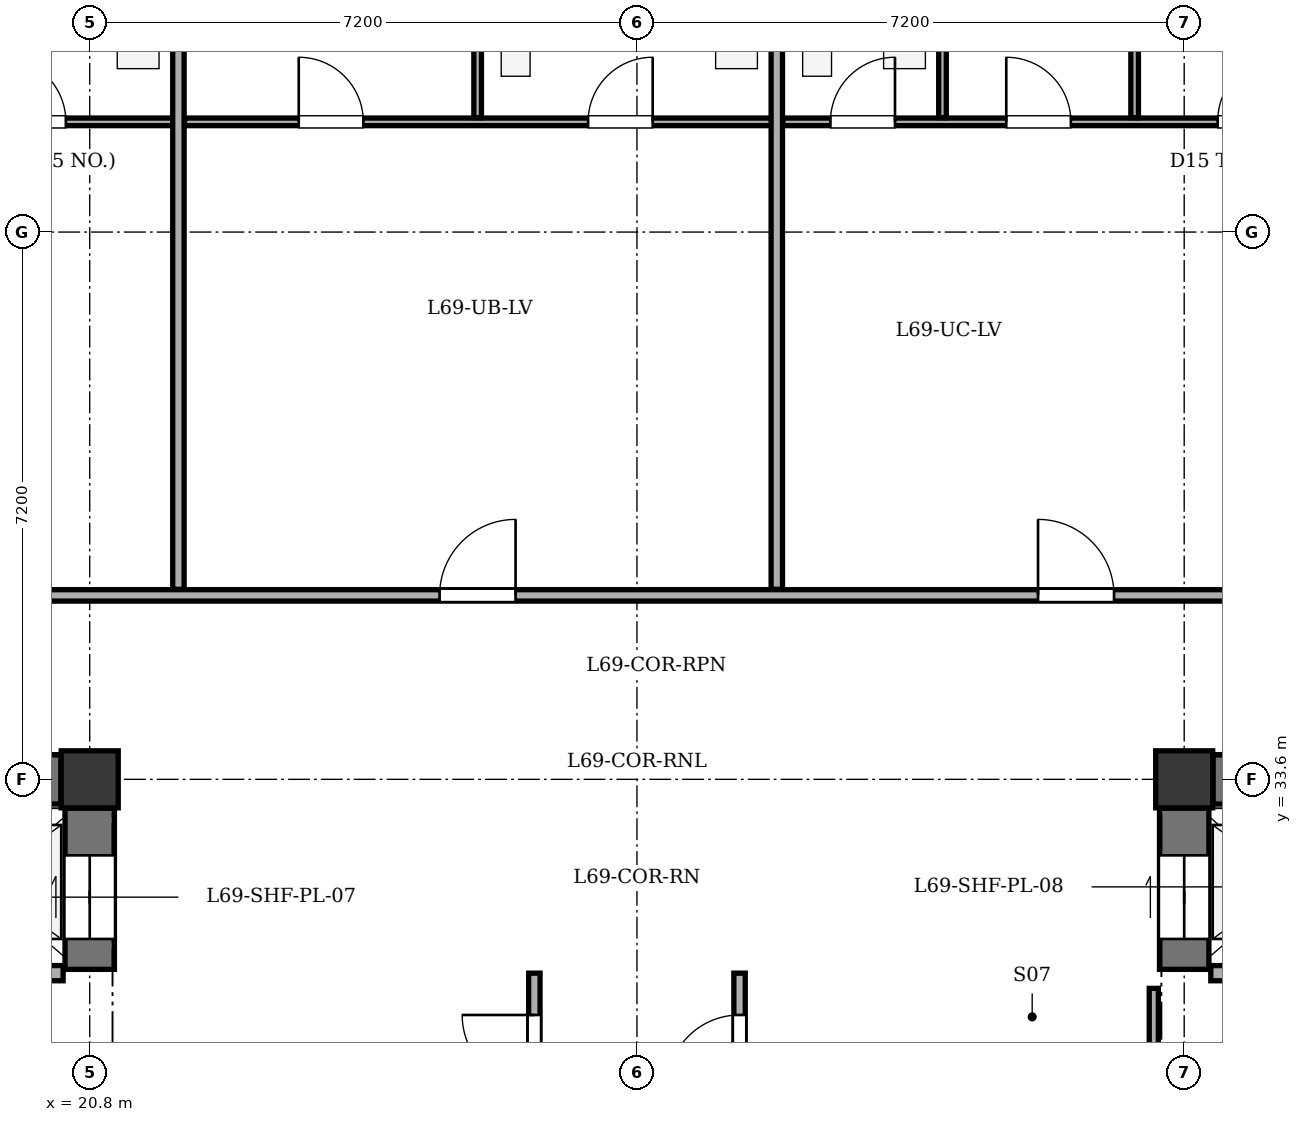
"""IFC4 building model, lengths in metres.
Left out: names, types, materials, properties, quantities, classifications, styles, units other than length and angle.
Written with IfcOpenShell. Run it as: python <this file> out.ifc"""

import sys

from ifc_helpers import new_model, si_unit, direction, frame, frame_2d, origin, origin_2d, place, context, subcontext, project, spatial, rectangle, extrude, element, fill, save


model = new_model("IFC4")
c1 = context("Model", 3, precision=1e-05, world=origin(), true_north=direction((0.0, 1.0)))
c2 = subcontext(c1, "Body", "Model", "MODEL_VIEW")
j1 = project(units=[si_unit("LENGTHUNIT", "METRE"), si_unit("PLANEANGLEUNIT", "RADIAN")], contexts=[c1])
p1 = place(None, origin())
s1 = spatial("IfcSite", under=j1, at=p1, CompositionType="ELEMENT")
p2 = place(p1, origin())
s2 = spatial("IfcBuilding", under=s1, at=p2, CompositionType="ELEMENT")
p3 = place(p2, frame((0.0, 0.0, 261.9)))
s3 = spatial("IfcBuildingStorey", under=s2, at=p3, CompositionType="ELEMENT", Elevation=261.9)
for number, where, z_axis, x_axis in (
    (1, (20.8, 33.6, 0.0), (0.0, 0.0, 1.0), (1.0, 0.0, 0.0)),
    (2, (35.2, 33.6, 0.0), (0.0, 0.0, 1.0), (1.0, 0.0, 0.0)),
):
    element("IfcColumn", number, at=place(p3, frame(where, z_axis=z_axis, x_axis=x_axis)), inside=s3, PredefinedType="COLUMN", context=c2, shape_type="SweptSolid", body=[
        extrude(rectangle(XDim=0.75, YDim=0.75, at=origin_2d()), origin(), (0.0, 0.0, 1.0), 3.4),
    ])
p4 = place(p3, frame((13.18, 33.6, 0.0), z_axis=(0.0, 0.0, 1.0), x_axis=(1.0, 0.0, 0.0)))
e3 = element("IfcWall", 3, at=p4, inside=s3, PredefinedType="SHEAR", context=c2, shape_type="SweptSolid", body=[
    extrude(rectangle(XDim=7.24, YDim=0.65, at=frame_2d((3.62, 0.0))), origin(), (0.0, 0.0, 1.0), 3.1),
])
p5 = place(p4, frame((1.22, 0.0, 0.0)))
e4 = element("IfcOpeningElement", 4, at=p5, cuts=e3, PredefinedType="OPENING", context=c2, shape_type="SweptSolid", body=[
    extrude(rectangle(XDim=0.85, YDim=2.02, at=frame_2d((0.425, 1.01))), frame((0.0, 0.335, 0.0), z_axis=(0.0, -1.0, 0.0), x_axis=(1.0, 0.0, 0.0)), (0.0, 0.0, 1.0), 0.67),
])
p6 = place(p3, frame((20.8, 31.1, 0.0), z_axis=(0.0, 0.0, 1.0), x_axis=(0.0, 1.0, 0.0)))
e5 = element("IfcWall", 5, at=p6, inside=s3, PredefinedType="SHEAR", context=c2, shape_type="SweptSolid", body=[
    extrude(rectangle(XDim=2.12, YDim=0.65, at=frame_2d((1.06, 0.0))), origin(), (0.0, 0.0, 1.0), 3.1),
])
p7 = place(p6, frame((0.4, 0.0, 0.0)))
e6 = element("IfcOpeningElement", 6, at=p7, cuts=e5, PredefinedType="OPENING", context=c2, shape_type="SweptSolid", body=[
    extrude(rectangle(XDim=1.1, YDim=2.1, at=frame_2d((0.55, 1.05))), frame((0.0, 0.335, 0.0), z_axis=(0.0, -1.0, 0.0), x_axis=(1.0, 0.0, 0.0)), (0.0, 0.0, 1.0), 0.67),
])
p8 = place(p3, frame((16.6, 31.05, 0.0), z_axis=(0.0, 0.0, 1.0), x_axis=(1.0, 0.0, 0.0)))
e7 = element("IfcWall", 7, at=p8, inside=s3, PredefinedType="SOLIDWALL", context=c2, shape_type="SweptSolid", body=[
    extrude(rectangle(XDim=3.85, YDim=0.2, at=frame_2d((1.925, 0.0))), origin(), (0.0, 0.0, 1.0), 3.1),
])
p9 = place(p3, frame((35.58, 33.6, 0.0), z_axis=(0.0, 0.0, 1.0), x_axis=(1.0, 0.0, 0.0)))
e8 = element("IfcWall", 8, at=p9, inside=s3, PredefinedType="SHEAR", context=c2, shape_type="SweptSolid", body=[
    extrude(rectangle(XDim=7.24, YDim=0.65, at=frame_2d((3.62, 0.0))), origin(), (0.0, 0.0, 1.0), 3.1),
])
p10 = place(p9, frame((4.82, 0.0, 0.0)))
e9 = element("IfcOpeningElement", 9, at=p10, cuts=e8, PredefinedType="OPENING", context=c2, shape_type="SweptSolid", body=[
    extrude(rectangle(XDim=1.3, YDim=2.15, at=frame_2d((0.65, 1.075))), frame((0.0, 0.335, 0.0), z_axis=(0.0, -1.0, 0.0), x_axis=(1.0, 0.0, 0.0)), (0.0, 0.0, 1.0), 0.67),
])
p11 = place(p9, frame((2.62, 0.0, 0.0)))
e10 = element("IfcOpeningElement", 10, at=p11, cuts=e8, PredefinedType="OPENING", context=c2, shape_type="SweptSolid", body=[
    extrude(rectangle(XDim=0.85, YDim=2.02, at=frame_2d((0.425, 1.01))), frame((0.0, 0.335, 0.0), z_axis=(0.0, -1.0, 0.0), x_axis=(1.0, 0.0, 0.0)), (0.0, 0.0, 1.0), 0.67),
])
p12 = place(p3, frame((35.2, 31.1, 0.0), z_axis=(0.0, 0.0, 1.0), x_axis=(0.0, 1.0, 0.0)))
e11 = element("IfcWall", 11, at=p12, inside=s3, PredefinedType="SHEAR", context=c2, shape_type="SweptSolid", body=[
    extrude(rectangle(XDim=2.12, YDim=0.65, at=frame_2d((1.06, 0.0))), origin(), (0.0, 0.0, 1.0), 3.1),
])
p13 = place(p12, frame((0.4, 0.0, 0.0)))
e12 = element("IfcOpeningElement", 12, at=p13, cuts=e11, PredefinedType="OPENING", context=c2, shape_type="SweptSolid", body=[
    extrude(rectangle(XDim=1.1, YDim=2.1, at=frame_2d((0.55, 1.05))), frame((0.0, 0.335, 0.0), z_axis=(0.0, -1.0, 0.0), x_axis=(1.0, 0.0, 0.0)), (0.0, 0.0, 1.0), 0.67),
])
p14 = place(p3, frame((35.55, 31.05, 0.0), z_axis=(0.0, 0.0, 1.0), x_axis=(1.0, 0.0, 0.0)))
e13 = element("IfcWall", 13, at=p14, inside=s3, PredefinedType="SOLIDWALL", context=c2, shape_type="SweptSolid", body=[
    extrude(rectangle(XDim=2.25, YDim=0.2, at=frame_2d((1.125, 0.0))), origin(), (0.0, 0.0, 1.0), 3.1),
])
p15 = place(p3, frame((26.65, 25.23, 0.0), z_axis=(0.0, 0.0, 1.0), x_axis=(0.0, 1.0, 0.0)))
e14 = element("IfcWall", 14, at=p15, inside=s3, PredefinedType="PARTITIONING", context=c2, shape_type="SweptSolid", body=[
    extrude(rectangle(XDim=5.82, YDim=0.15, at=frame_2d((2.91, 0.0))), origin(), (0.0, 0.0, 1.0), 3.1),
])
p16 = place(p15, frame((1.42, 0.0, 0.0)))
e15 = element("IfcOpeningElement", 15, at=p16, cuts=e14, PredefinedType="OPENING", context=c2, shape_type="SweptSolid", body=[
    extrude(rectangle(XDim=0.95, YDim=2.1, at=frame_2d((0.475, 1.05))), frame((0.0, 0.085, 0.0), z_axis=(0.0, -1.0, 0.0), x_axis=(1.0, 0.0, 0.0)), (0.0, 0.0, 1.0), 0.17),
])
p17 = place(p15, frame((4.32, 0.0, 0.0)))
e16 = element("IfcOpeningElement", 16, at=p17, cuts=e14, PredefinedType="OPENING", context=c2, shape_type="SweptSolid", body=[
    extrude(rectangle(XDim=0.95, YDim=2.1, at=frame_2d((0.475, 1.05))), frame((0.0, 0.085, 0.0), z_axis=(0.0, -1.0, 0.0), x_axis=(1.0, 0.0, 0.0)), (0.0, 0.0, 1.0), 0.17),
])
p18 = place(p3, frame((29.35, 25.23, 0.0), z_axis=(0.0, 0.0, 1.0), x_axis=(0.0, 1.0, 0.0)))
e17 = element("IfcWall", 17, at=p18, inside=s3, PredefinedType="PARTITIONING", context=c2, shape_type="SweptSolid", body=[
    extrude(rectangle(XDim=5.82, YDim=0.15, at=frame_2d((2.91, 0.0))), origin(), (0.0, 0.0, 1.0), 3.1),
])
p19 = place(p18, frame((1.42, 0.0, 0.0)))
e18 = element("IfcOpeningElement", 18, at=p19, cuts=e17, PredefinedType="OPENING", context=c2, shape_type="SweptSolid", body=[
    extrude(rectangle(XDim=0.95, YDim=2.1, at=frame_2d((0.475, 1.05))), frame((0.0, 0.085, 0.0), z_axis=(0.0, -1.0, 0.0), x_axis=(1.0, 0.0, 0.0)), (0.0, 0.0, 1.0), 0.17),
])
p20 = place(p18, frame((4.32, 0.0, 0.0)))
e19 = element("IfcOpeningElement", 19, at=p20, cuts=e17, PredefinedType="OPENING", context=c2, shape_type="SweptSolid", body=[
    extrude(rectangle(XDim=0.95, YDim=2.1, at=frame_2d((0.475, 1.05))), frame((0.0, 0.085, 0.0), z_axis=(0.0, -1.0, 0.0), x_axis=(1.0, 0.0, 0.0)), (0.0, 0.0, 1.0), 0.17),
])
p21 = place(p3, frame((34.8, 25.25, 0.0), z_axis=(0.0, 0.0, 1.0), x_axis=(0.0, 1.0, 0.0)))
e20 = element("IfcWall", 20, at=p21, inside=s3, PredefinedType="PARTITIONING", context=c2, shape_type="SweptSolid", body=[
    extrude(rectangle(XDim=5.6, YDim=0.12, at=frame_2d((2.8, 0.0))), origin(), (0.0, 0.0, 1.0), 3.1),
])
p22 = place(p21, frame((1.0, 0.0, 0.0)))
e21 = element("IfcOpeningElement", 21, at=p22, cuts=e20, PredefinedType="OPENING", context=c2, shape_type="SweptSolid", body=[
    extrude(rectangle(XDim=0.9, YDim=2.05, at=frame_2d((0.45, 1.025))), frame((0.0, 0.07, 0.0), z_axis=(0.0, -1.0, 0.0), x_axis=(1.0, 0.0, 0.0)), (0.0, 0.0, 1.0), 0.14),
])
p23 = place(p3, frame((14.58, 36.02, 0.0), z_axis=(0.0, 0.0, 1.0), x_axis=(1.0, 0.0, 0.0)))
e22 = element("IfcWall", 22, at=p23, inside=s3, PredefinedType="PARTITIONING", context=c2, shape_type="SweptSolid", body=[
    extrude(rectangle(XDim=30.52, YDim=0.15, at=frame_2d((15.26, 0.0))), origin(), (0.0, 0.0, 1.0), 3.1),
])
p24 = place(p23, frame((3.253, 0.0, 0.0)))
e23 = element("IfcOpeningElement", 23, at=p24, cuts=e22, PredefinedType="OPENING", context=c2, shape_type="SweptSolid", body=[
    extrude(rectangle(XDim=1.0, YDim=2.1, at=frame_2d((0.5, 1.05))), frame((0.0, 0.085, 0.0), z_axis=(0.0, -1.0, 0.0), x_axis=(1.0, 0.0, 0.0)), (0.0, 0.0, 1.0), 0.17),
])
p25 = place(p23, frame((10.823, 0.0, 0.0)))
e24 = element("IfcOpeningElement", 24, at=p25, cuts=e22, PredefinedType="OPENING", context=c2, shape_type="SweptSolid", body=[
    extrude(rectangle(XDim=1.0, YDim=2.1, at=frame_2d((0.5, 1.05))), frame((0.0, 0.085, 0.0), z_axis=(0.0, -1.0, 0.0), x_axis=(1.0, 0.0, 0.0)), (0.0, 0.0, 1.0), 0.17),
])
p26 = place(p23, frame((18.697, 0.0, 0.0)))
e25 = element("IfcOpeningElement", 25, at=p26, cuts=e22, PredefinedType="OPENING", context=c2, shape_type="SweptSolid", body=[
    extrude(rectangle(XDim=1.0, YDim=2.1, at=frame_2d((0.5, 1.05))), frame((0.0, 0.085, 0.0), z_axis=(0.0, -1.0, 0.0), x_axis=(1.0, 0.0, 0.0)), (0.0, 0.0, 1.0), 0.17),
])
p27 = place(p23, frame((26.267, 0.0, 0.0)))
e26 = element("IfcOpeningElement", 26, at=p27, cuts=e22, PredefinedType="OPENING", context=c2, shape_type="SweptSolid", body=[
    extrude(rectangle(XDim=1.0, YDim=2.1, at=frame_2d((0.5, 1.05))), frame((0.0, 0.085, 0.0), z_axis=(0.0, -1.0, 0.0), x_axis=(1.0, 0.0, 0.0)), (0.0, 0.0, 1.0), 0.17),
])
p28 = place(p3, frame((14.78, 42.25, 0.0), z_axis=(0.0, 0.0, 1.0), x_axis=(1.0, 0.0, 0.0)))
e27 = element("IfcWall", 27, at=p28, inside=s3, PredefinedType="PARTITIONING", context=c2, shape_type="SweptSolid", body=[
    extrude(rectangle(XDim=7.227, YDim=0.1, at=frame_2d((3.614, 0.0))), origin(), (0.0, 0.0, 1.0), 3.1),
])
p29 = place(p28, frame((1.352, 0.0, 0.0)))
e28 = element("IfcOpeningElement", 28, at=p29, cuts=e27, PredefinedType="OPENING", context=c2, shape_type="SweptSolid", body=[
    extrude(rectangle(XDim=0.85, YDim=2.05, at=frame_2d((0.425, 1.025))), frame((0.0, 0.06, 0.0), z_axis=(0.0, -1.0, 0.0), x_axis=(1.0, 0.0, 0.0)), (0.0, 0.0, 1.0), 0.12),
])
p30 = place(p28, frame((4.856, 0.0, 0.0)))
e29 = element("IfcOpeningElement", 29, at=p30, cuts=e27, PredefinedType="OPENING", context=c2, shape_type="SweptSolid", body=[
    extrude(rectangle(XDim=0.85, YDim=2.05, at=frame_2d((0.425, 1.025))), frame((0.0, 0.06, 0.0), z_axis=(0.0, -1.0, 0.0), x_axis=(1.0, 0.0, 0.0)), (0.0, 0.0, 1.0), 0.12),
])
p31 = place(p3, frame((21.967, 36.1, 0.0), z_axis=(0.0, 0.0, 1.0), x_axis=(0.0, 1.0, 0.0)))
e30 = element("IfcWall", 30, at=p31, inside=s3, PredefinedType="PARTITIONING", context=c2, shape_type="SweptSolid", body=[
    extrude(rectangle(XDim=8.655, YDim=0.15, at=frame_2d((4.327, 0.0))), origin(), (0.0, 0.0, 1.0), 3.1),
])
p32 = place(p3, frame((22.047, 42.25, 0.0), z_axis=(0.0, 0.0, 1.0), x_axis=(1.0, 0.0, 0.0)))
e31 = element("IfcWall", 31, at=p32, inside=s3, PredefinedType="PARTITIONING", context=c2, shape_type="SweptSolid", body=[
    extrude(rectangle(XDim=7.833, YDim=0.1, at=frame_2d((3.917, 0.0))), origin(), (0.0, 0.0, 1.0), 3.1),
])
p33 = place(p32, frame((1.503, 0.0, 0.0)))
e32 = element("IfcOpeningElement", 32, at=p33, cuts=e31, PredefinedType="OPENING", context=c2, shape_type="SweptSolid", body=[
    extrude(rectangle(XDim=0.85, YDim=2.05, at=frame_2d((0.425, 1.025))), frame((0.0, 0.06, 0.0), z_axis=(0.0, -1.0, 0.0), x_axis=(1.0, 0.0, 0.0)), (0.0, 0.0, 1.0), 0.12),
])
p34 = place(p32, frame((5.31, 0.0, 0.0)))
e33 = element("IfcOpeningElement", 33, at=p34, cuts=e31, PredefinedType="OPENING", context=c2, shape_type="SweptSolid", body=[
    extrude(rectangle(XDim=0.85, YDim=2.05, at=frame_2d((0.425, 1.025))), frame((0.0, 0.06, 0.0), z_axis=(0.0, -1.0, 0.0), x_axis=(1.0, 0.0, 0.0)), (0.0, 0.0, 1.0), 0.12),
])
p35 = place(p3, frame((25.904, 42.305, 0.0), z_axis=(0.0, 0.0, 1.0), x_axis=(0.0, 1.0, 0.0)))
e34 = element("IfcWall", 34, at=p35, inside=s3, PredefinedType="PARTITIONING", context=c2, shape_type="SweptSolid", body=[
    extrude(rectangle(XDim=2.45, YDim=0.1, at=frame_2d((1.225, 0.0))), origin(), (0.0, 0.0, 1.0), 3.1),
])
p36 = place(p3, frame((29.84, 36.1, 0.0), z_axis=(0.0, 0.0, 1.0), x_axis=(0.0, 1.0, 0.0)))
e35 = element("IfcWall", 35, at=p36, inside=s3, PredefinedType="PARTITIONING", context=c2, shape_type="SweptSolid", body=[
    extrude(rectangle(XDim=8.655, YDim=0.15, at=frame_2d((4.327, 0.0))), origin(), (0.0, 0.0, 1.0), 2.725),
])
p37 = place(p3, frame((29.92, 42.25, 0.0), z_axis=(0.0, 0.0, 1.0), x_axis=(1.0, 0.0, 0.0)))
e36 = element("IfcWall", 36, at=p37, inside=s3, PredefinedType="PARTITIONING", context=c2, shape_type="SweptSolid", body=[
    extrude(rectangle(XDim=7.833, YDim=0.1, at=frame_2d((3.917, 0.0))), origin(), (0.0, 0.0, 1.0), 3.1),
])
p38 = place(p37, frame((0.625, 0.0, 0.0)))
e37 = element("IfcOpeningElement", 37, at=p38, cuts=e36, PredefinedType="OPENING", context=c2, shape_type="SweptSolid", body=[
    extrude(rectangle(XDim=0.85, YDim=2.05, at=frame_2d((0.425, 1.025))), frame((0.0, 0.06, 0.0), z_axis=(0.0, -1.0, 0.0), x_axis=(1.0, 0.0, 0.0)), (0.0, 0.0, 1.0), 0.12),
])
p39 = place(p37, frame((2.939, 0.0, 0.0)))
e38 = element("IfcOpeningElement", 38, at=p39, cuts=e36, PredefinedType="OPENING", context=c2, shape_type="SweptSolid", body=[
    extrude(rectangle(XDim=0.85, YDim=2.05, at=frame_2d((0.425, 1.025))), frame((0.0, 0.06, 0.0), z_axis=(0.0, -1.0, 0.0), x_axis=(1.0, 0.0, 0.0)), (0.0, 0.0, 1.0), 0.12),
])
p40 = place(p37, frame((5.72, 0.0, 0.0)))
e39 = element("IfcOpeningElement", 39, at=p40, cuts=e36, PredefinedType="OPENING", context=c2, shape_type="SweptSolid", body=[
    extrude(rectangle(XDim=0.9, YDim=2.05, at=frame_2d((0.45, 1.025))), frame((0.0, 0.06, 0.0), z_axis=(0.0, -1.0, 0.0), x_axis=(1.0, 0.0, 0.0)), (0.0, 0.0, 1.0), 0.12),
])
for number, where, z_axis, x_axis in (
    (40, (32.02, 42.305, 0.0), (0.0, 0.0, 1.0), (0.0, 1.0, 0.0)),
    (41, (34.548, 42.305, 0.0), (0.0, 0.0, 1.0), (0.0, 1.0, 0.0)),
):
    element("IfcWall", number, at=place(p3, frame(where, z_axis=z_axis, x_axis=x_axis)), inside=s3, PredefinedType="PARTITIONING", context=c2, shape_type="SweptSolid", body=[
        extrude(rectangle(XDim=2.45, YDim=0.1, at=frame_2d((1.225, 0.0))), origin(), (0.0, 0.0, 1.0), 3.1),
    ])
p41 = place(p7, origin())
e42 = element("IfcDoor", 42, at=p41, inside=s3, OperationType="DOUBLE_DOOR_SLIDING", PredefinedType="DOOR", context=c2, shape_type="SweptSolid", body=[
    extrude(rectangle(XDim=1.1, YDim=2.1, at=frame_2d((0.55, 1.05))), frame((0.0, 0.025, 0.0), z_axis=(0.0, -1.0, 0.0), x_axis=(1.0, 0.0, 0.0)), (0.0, 0.0, 1.0), 0.05),
])
fill(e6, e42)
p42 = place(p13, origin())
e43 = element("IfcDoor", 43, at=p42, inside=s3, OperationType="DOUBLE_DOOR_SLIDING", PredefinedType="DOOR", context=c2, shape_type="SweptSolid", body=[
    extrude(rectangle(XDim=1.1, YDim=2.1, at=frame_2d((0.55, 1.05))), frame((0.0, 0.025, 0.0), z_axis=(0.0, -1.0, 0.0), x_axis=(1.0, 0.0, 0.0)), (0.0, 0.0, 1.0), 0.05),
])
fill(e12, e43)
p43 = place(p17, origin())
e44 = element("IfcDoor", 44, at=p43, inside=s3, OperationType="SINGLE_SWING_RIGHT", PredefinedType="DOOR", context=c2, shape_type="SweptSolid", body=[
    extrude(rectangle(XDim=0.95, YDim=2.1, at=frame_2d((0.475, 1.05))), frame((0.0, 0.025, 0.0), z_axis=(0.0, -1.0, 0.0), x_axis=(1.0, 0.0, 0.0)), (0.0, 0.0, 1.0), 0.05),
])
fill(e16, e44)
p44 = place(p20, origin())
e45 = element("IfcDoor", 45, at=p44, inside=s3, OperationType="SINGLE_SWING_LEFT", PredefinedType="DOOR", context=c2, shape_type="SweptSolid", body=[
    extrude(rectangle(XDim=0.95, YDim=2.1, at=frame_2d((0.475, 1.05))), frame((0.0, 0.025, 0.0), z_axis=(0.0, -1.0, 0.0), x_axis=(1.0, 0.0, 0.0)), (0.0, 0.0, 1.0), 0.05),
])
fill(e19, e45)
p45 = place(p25, origin())
e46 = element("IfcDoor", 46, at=p45, inside=s3, OperationType="SINGLE_SWING_RIGHT", PredefinedType="DOOR", context=c2, shape_type="SweptSolid", body=[
    extrude(rectangle(XDim=1.0, YDim=2.1, at=frame_2d((0.5, 1.05))), frame((0.0, 0.025, 0.0), z_axis=(0.0, -1.0, 0.0), x_axis=(1.0, 0.0, 0.0)), (0.0, 0.0, 1.0), 0.05),
])
fill(e24, e46)
p46 = place(p26, origin())
e47 = element("IfcDoor", 47, at=p46, inside=s3, OperationType="SINGLE_SWING_LEFT", PredefinedType="DOOR", context=c2, shape_type="SweptSolid", body=[
    extrude(rectangle(XDim=1.0, YDim=2.1, at=frame_2d((0.5, 1.05))), frame((0.0, 0.025, 0.0), z_axis=(0.0, -1.0, 0.0), x_axis=(1.0, 0.0, 0.0)), (0.0, 0.0, 1.0), 0.05),
])
fill(e25, e47)
p47 = place(p30, origin())
e48 = element("IfcDoor", 48, at=p47, inside=s3, OperationType="SINGLE_SWING_LEFT", PredefinedType="DOOR", context=c2, shape_type="SweptSolid", body=[
    extrude(rectangle(XDim=0.85, YDim=2.05, at=frame_2d((0.425, 1.025))), frame((0.0, 0.025, 0.0), z_axis=(0.0, -1.0, 0.0), x_axis=(1.0, 0.0, 0.0)), (0.0, 0.0, 1.0), 0.05),
])
fill(e29, e48)
p48 = place(p33, origin())
e49 = element("IfcDoor", 49, at=p48, inside=s3, OperationType="SINGLE_SWING_LEFT", PredefinedType="DOOR", context=c2, shape_type="SweptSolid", body=[
    extrude(rectangle(XDim=0.85, YDim=2.05, at=frame_2d((0.425, 1.025))), frame((0.0, 0.025, 0.0), z_axis=(0.0, -1.0, 0.0), x_axis=(1.0, 0.0, 0.0)), (0.0, 0.0, 1.0), 0.05),
])
fill(e32, e49)
p49 = place(p34, origin())
e50 = element("IfcDoor", 50, at=p49, inside=s3, OperationType="SINGLE_SWING_RIGHT", PredefinedType="DOOR", context=c2, shape_type="SweptSolid", body=[
    extrude(rectangle(XDim=0.85, YDim=2.05, at=frame_2d((0.425, 1.025))), frame((0.0, 0.025, 0.0), z_axis=(0.0, -1.0, 0.0), x_axis=(1.0, 0.0, 0.0)), (0.0, 0.0, 1.0), 0.05),
])
fill(e33, e50)
p50 = place(p38, origin())
e51 = element("IfcDoor", 51, at=p50, inside=s3, OperationType="SINGLE_SWING_RIGHT", PredefinedType="DOOR", context=c2, shape_type="SweptSolid", body=[
    extrude(rectangle(XDim=0.85, YDim=2.05, at=frame_2d((0.425, 1.025))), frame((0.0, 0.025, 0.0), z_axis=(0.0, -1.0, 0.0), x_axis=(1.0, 0.0, 0.0)), (0.0, 0.0, 1.0), 0.05),
])
fill(e37, e51)
p51 = place(p39, origin())
e52 = element("IfcDoor", 52, at=p51, inside=s3, OperationType="SINGLE_SWING_LEFT", PredefinedType="DOOR", context=c2, shape_type="SweptSolid", body=[
    extrude(rectangle(XDim=0.85, YDim=2.05, at=frame_2d((0.425, 1.025))), frame((0.0, 0.025, 0.0), z_axis=(0.0, -1.0, 0.0), x_axis=(1.0, 0.0, 0.0)), (0.0, 0.0, 1.0), 0.05),
])
fill(e38, e52)
p52 = place(p40, origin())
e53 = element("IfcDoor", 53, at=p52, inside=s3, OperationType="SINGLE_SWING_RIGHT", PredefinedType="DOOR", context=c2, shape_type="SweptSolid", body=[
    extrude(rectangle(XDim=0.9, YDim=2.05, at=frame_2d((0.45, 1.025))), frame((0.0, 0.025, 0.0), z_axis=(0.0, -1.0, 0.0), x_axis=(1.0, 0.0, 0.0)), (0.0, 0.0, 1.0), 0.05),
])
fill(e39, e53)
save(model, sys.argv[1])
